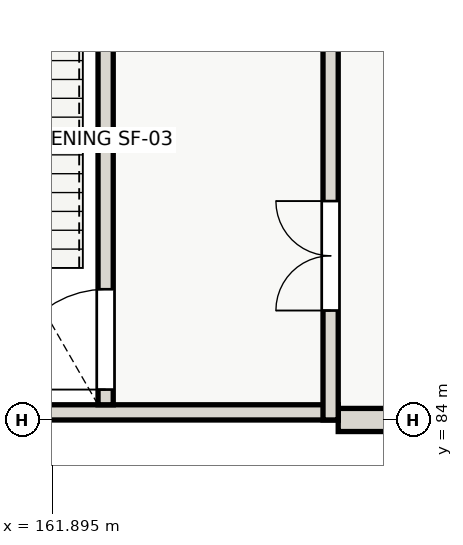
"""IFC4 building model, lengths in metres.
Left out: names, types, materials, properties, quantities, classifications, styles, units other than length and angle.
Written with IfcOpenShell. Run it as: python <this file> out.ifc"""

import sys

from ifc_helpers import new_model, si_unit, direction, frame, frame_2d, origin, place, context, subcontext, project, spatial, rectangle, extrude, element, fill, save


model = new_model("IFC4")
c1 = context("Model", 3, precision=1e-05, world=origin(), true_north=direction((0.0, 1.0)))
c2 = subcontext(c1, "Body", "Model", "MODEL_VIEW")
j1 = project(units=[si_unit("LENGTHUNIT", "METRE"), si_unit("PLANEANGLEUNIT", "RADIAN")], contexts=[c1])
p1 = place(None, origin())
s1 = spatial("IfcSite", under=j1, at=p1, CompositionType="ELEMENT")
p2 = place(p1, origin())
s2 = spatial("IfcBuilding", under=s1, at=p2, CompositionType="ELEMENT")
p3 = place(p2, frame((0.0, 0.0, 4.2)))
s3 = spatial("IfcBuildingStorey", under=s2, at=p3, CompositionType="ELEMENT", Elevation=4.2)
p4 = place(p3, frame((168.0, 84.0, 0.0), z_axis=(0.0, 0.0, 1.0), x_axis=(-1.0, 0.0, 0.0)))
e1 = element("IfcWall", 1, at=p4, inside=s3, PredefinedType="SOLIDWALL", context=c2, shape_type="SweptSolid", body=[
    extrude(rectangle(XDim=1.4, YDim=0.38, at=frame_2d((0.7, 0.0))), origin(), (0.0, 0.0, 1.0), 3.53),
])
p5 = place(p3, frame((166.6, 84.125, 0.0), z_axis=(0.0, 0.0, 1.0), x_axis=(-1.0, 0.0, 0.0)))
e2 = element("IfcWall", 2, at=p5, inside=s3, PredefinedType="SHEAR", context=c2, shape_type="SweptSolid", body=[
    extrude(rectangle(XDim=9.2, YDim=0.25, at=frame_2d((4.6, 0.0))), origin(), (0.0, 0.0, 1.0), 4.2),
])
p6 = place(p3, frame((166.475, 84.0, 0.0), z_axis=(0.0, 0.0, 1.0), x_axis=(0.0, 1.0, 0.0)))
e3 = element("IfcWall", 3, at=p6, inside=s3, PredefinedType="SHEAR", context=c2, shape_type="SweptSolid", body=[
    extrude(rectangle(XDim=9.2, YDim=0.25, at=frame_2d((4.6, 0.0))), origin(), (0.0, 0.0, 1.0), 4.2),
])
p7 = place(p6, frame((1.8, 0.0, 0.0)))
e4 = element("IfcOpeningElement", 4, at=p7, cuts=e3, PredefinedType="OPENING", context=c2, shape_type="SweptSolid", body=[
    extrude(rectangle(XDim=1.8, YDim=2.15, at=frame_2d((0.9, 1.075))), frame((0.0, 0.135, 0.0), z_axis=(0.0, -1.0, 0.0), x_axis=(1.0, 0.0, 0.0)), (0.0, 0.0, 1.0), 0.27),
])
p8 = place(p3, frame((162.775, 84.25, 0.0), z_axis=(0.0, 0.0, 1.0), x_axis=(0.0, 1.0, 0.0)))
e5 = element("IfcWall", 5, at=p8, inside=s3, PredefinedType="SHEAR", context=c2, shape_type="SweptSolid", body=[
    extrude(rectangle(XDim=8.7, YDim=0.25, at=frame_2d((4.35, 0.0))), origin(), (0.0, 0.0, 1.0), 4.2),
])
p9 = place(p8, frame((0.25, 0.0, 0.0)))
e6 = element("IfcOpeningElement", 6, at=p9, cuts=e5, PredefinedType="OPENING", context=c2, shape_type="SweptSolid", body=[
    extrude(rectangle(XDim=1.65, YDim=2.1, at=frame_2d((0.825, 1.05))), frame((0.0, 0.135, 0.0), z_axis=(0.0, -1.0, 0.0), x_axis=(1.0, 0.0, 0.0)), (0.0, 0.0, 1.0), 0.27),
])
p10 = place(p7, origin())
e7 = element("IfcDoor", 7, at=p10, inside=s3, OperationType="DOUBLE_DOOR_SINGLE_SWING", PredefinedType="DOOR", context=c2, shape_type="SweptSolid", body=[
    extrude(rectangle(XDim=1.8, YDim=2.15, at=frame_2d((0.9, 1.075))), frame((0.0, 0.025, 0.0), z_axis=(0.0, -1.0, 0.0), x_axis=(1.0, 0.0, 0.0)), (0.0, 0.0, 1.0), 0.05),
])
fill(e4, e7)
p11 = place(p9, origin())
e8 = element("IfcDoor", 8, at=p11, inside=s3, OperationType="SINGLE_SWING_LEFT", PredefinedType="DOOR", context=c2, shape_type="SweptSolid", body=[
    extrude(rectangle(XDim=1.65, YDim=2.1, at=frame_2d((0.825, 1.05))), frame((0.0, 0.025, 0.0), z_axis=(0.0, -1.0, 0.0), x_axis=(1.0, 0.0, 0.0)), (0.0, 0.0, 1.0), 0.05),
])
fill(e6, e8)
save(model, sys.argv[1])
